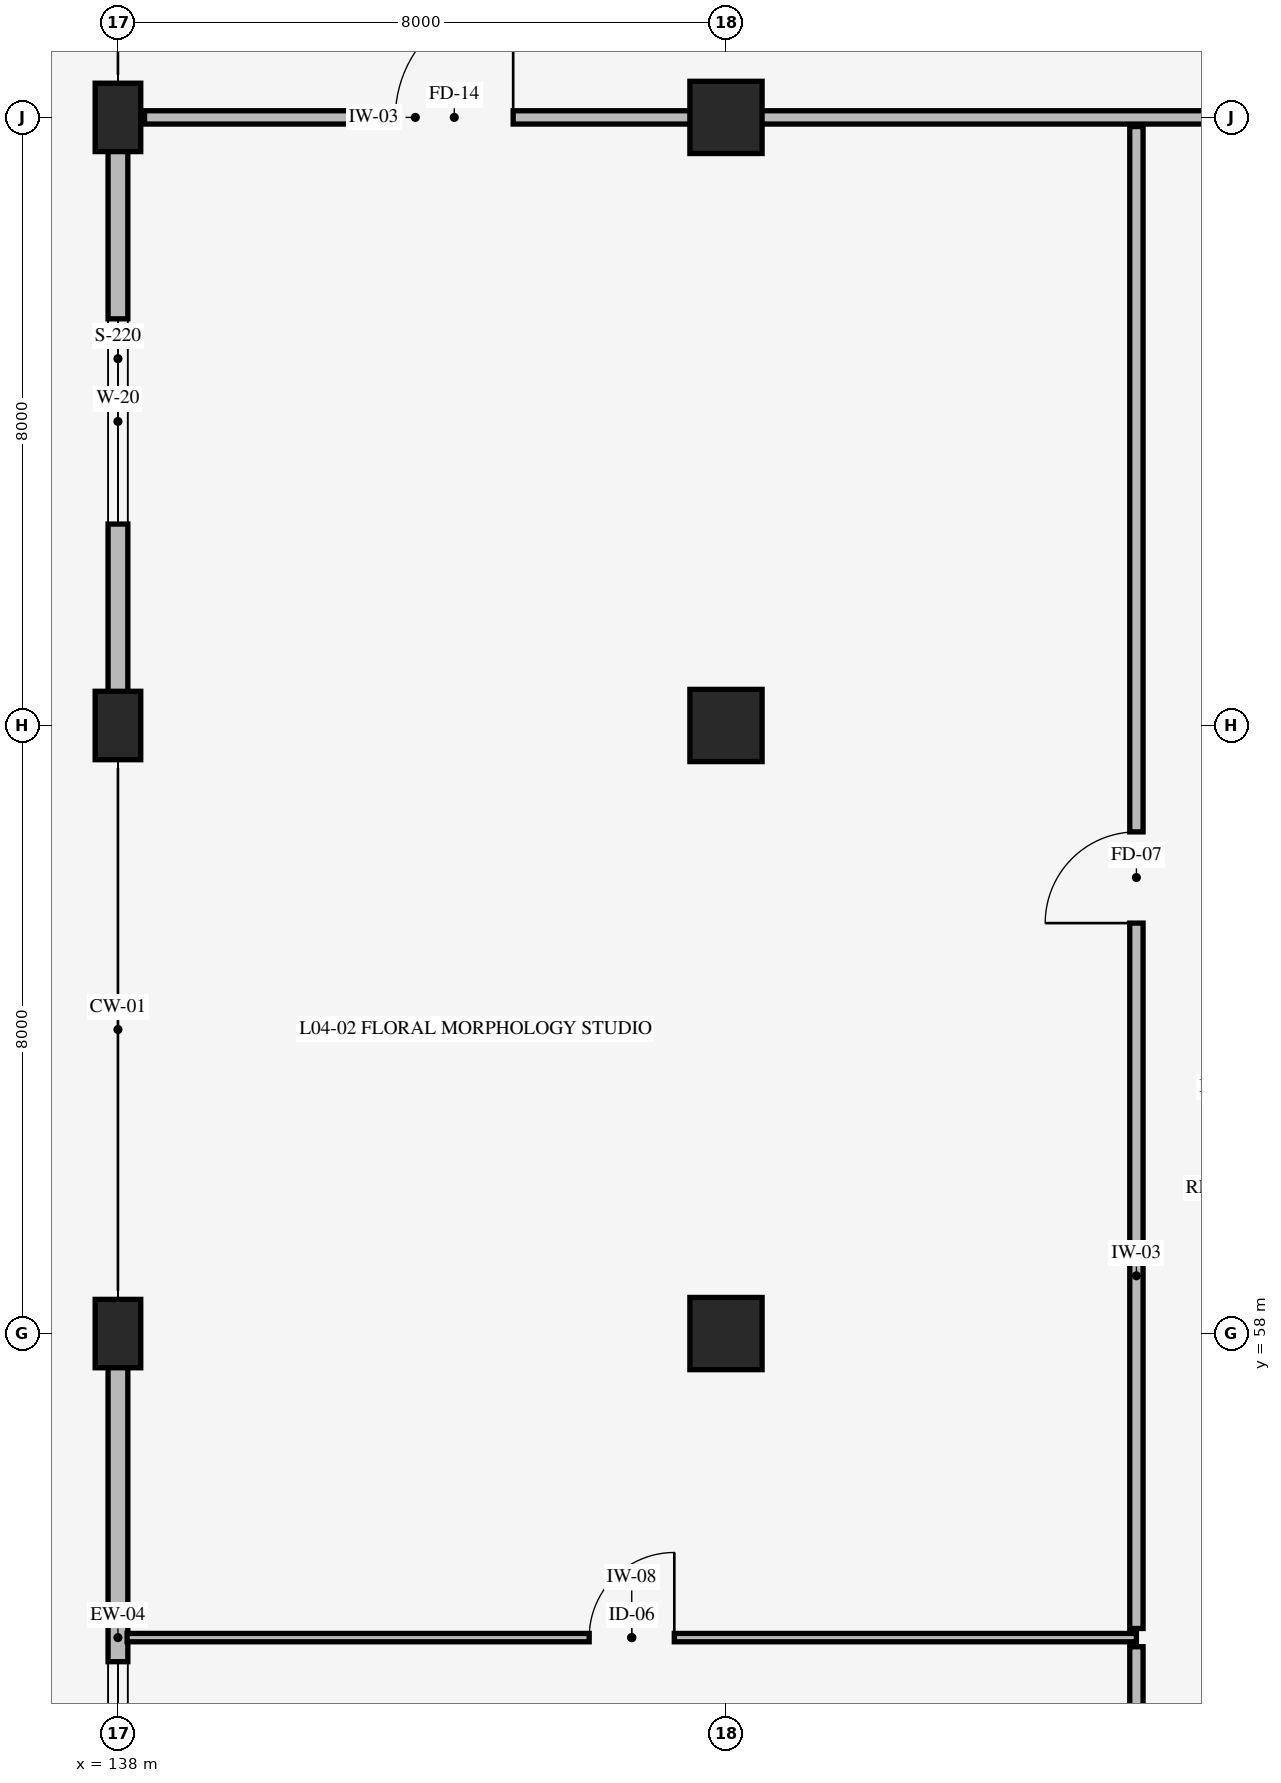
"""IFC4 building model, lengths in metres.
Left out: names, types, materials, properties, quantities, classifications, styles, units other than length and angle.
Written with IfcOpenShell. Run it as: python <this file> out.ifc"""

import sys

from ifc_helpers import new_model, si_unit, direction, frame, frame_2d, origin, origin_2d, place, context, subcontext, project, spatial, rectangle, extrude, element, fill, save


model = new_model("IFC4")
c1 = context("Model", 3, precision=1e-05, world=origin(), true_north=direction((0.0, 1.0)))
c2 = subcontext(c1, "Body", "Model", "MODEL_VIEW")
j1 = project(units=[si_unit("LENGTHUNIT", "METRE"), si_unit("PLANEANGLEUNIT", "RADIAN")], contexts=[c1])
p1 = place(None, origin())
s1 = spatial("IfcSite", under=j1, at=p1, CompositionType="ELEMENT")
p2 = place(p1, origin())
s2 = spatial("IfcBuilding", under=s1, at=p2, CompositionType="ELEMENT")
p3 = place(p2, frame((0.0, 0.0, 15.0)))
s3 = spatial("IfcBuildingStorey", under=s2, at=p3, CompositionType="ELEMENT", Elevation=15.0)
for number, where, z_axis, x_axis in (
    (1, (138.0, 58.0, 0.0), (0.0, 0.0, 1.0), (1.0, 0.0, 0.0)),
    (2, (138.0, 66.0, 0.0), (0.0, 0.0, 1.0), (1.0, 0.0, 0.0)),
    (3, (138.0, 74.0, 0.0), (0.0, 0.0, 1.0), (1.0, 0.0, 0.0)),
):
    element("IfcColumn", number, at=place(p3, frame(where, z_axis=z_axis, x_axis=x_axis)), inside=s3, PredefinedType="COLUMN", context=c2, shape_type="SweptSolid", body=[
        extrude(rectangle(XDim=0.6, YDim=0.9, at=origin_2d()), origin(), (0.0, 0.0, 1.0), 4.2),
    ])
for number, where, z_axis, x_axis in (
    (4, (146.0, 58.0, 0.0), (0.0, 0.0, 1.0), (1.0, 0.0, 0.0)),
    (5, (146.0, 66.0, 0.0), (0.0, 0.0, 1.0), (1.0, 0.0, 0.0)),
    (6, (146.0, 74.0, 0.0), (0.0, 0.0, 1.0), (1.0, 0.0, 0.0)),
):
    element("IfcColumn", number, at=place(p3, frame(where, z_axis=z_axis, x_axis=x_axis)), inside=s3, PredefinedType="COLUMN", context=c2, shape_type="SweptSolid", body=[
        extrude(rectangle(XDim=0.95, YDim=0.95, at=origin_2d()), origin(), (0.0, 0.0, 1.0), 4.2),
    ])
p4 = place(p3, frame((138.0, 50.0, 0.0), z_axis=(0.0, 0.0, 1.0), x_axis=(0.0, 1.0, 0.0)))
e7 = element("IfcWall", 7, at=p4, inside=s3, PredefinedType="STANDARD", context=c2, shape_type="SweptSolid", body=[
    extrude(rectangle(XDim=8.0, YDim=0.26, at=frame_2d((4.0, 0.0))), origin(), (0.0, 0.0, 1.0), 3.08),
])
p5 = place(p4, frame((1.383, 0.0, 0.85)))
e8 = element("IfcOpeningElement", 8, at=p5, cuts=e7, PredefinedType="OPENING", context=c2, shape_type="SweptSolid", body=[
    extrude(rectangle(XDim=2.3, YDim=1.5, at=frame_2d((1.15, 0.75))), frame((0.0, 0.14, 0.0), z_axis=(0.0, -1.0, 0.0), x_axis=(1.0, 0.0, 0.0)), (0.0, 0.0, 1.0), 0.28),
])
p6 = place(p3, frame((138.0, 66.0, 0.0), z_axis=(0.0, 0.0, 1.0), x_axis=(0.0, 1.0, 0.0)))
e9 = element("IfcWall", 9, at=p6, inside=s3, PredefinedType="STANDARD", context=c2, shape_type="SweptSolid", body=[
    extrude(rectangle(XDim=8.0, YDim=0.26, at=frame_2d((4.0, 0.0))), origin(), (0.0, 0.0, 1.0), 3.08),
])
p7 = place(p6, frame((2.65, 0.0, 0.85)))
e10 = element("IfcOpeningElement", 10, at=p7, cuts=e9, PredefinedType="OPENING", context=c2, shape_type="SweptSolid", body=[
    extrude(rectangle(XDim=2.7, YDim=1.8, at=frame_2d((1.35, 0.9))), frame((0.0, 0.14, 0.0), z_axis=(0.0, -1.0, 0.0), x_axis=(1.0, 0.0, 0.0)), (0.0, 0.0, 1.0), 0.28),
])
p8 = place(p3, frame((151.4, 34.12, 0.0), z_axis=(0.0, 0.0, 1.0), x_axis=(0.0, 1.0, 0.0)))
e11 = element("IfcWall", 11, at=p8, inside=s3, PredefinedType="STANDARD", context=c2, shape_type="SweptSolid", body=[
    extrude(rectangle(XDim=19.76, YDim=0.175, at=frame_2d((9.88, 0.0))), origin(), (0.0, 0.0, 1.0), 3.9),
])
p9 = place(p8, frame((9.305, 0.0, 0.0)))
e12 = element("IfcOpeningElement", 12, at=p9, cuts=e11, PredefinedType="OPENING", context=c2, shape_type="SweptSolid", body=[
    extrude(rectangle(XDim=1.15, YDim=2.1, at=frame_2d((0.575, 1.05))), frame((0.0, 0.098, 0.0), z_axis=(0.0, -1.0, 0.0), x_axis=(1.0, 0.0, 0.0)), (0.0, 0.0, 1.0), 0.195),
])
p10 = place(p3, frame((138.12, 54.0, 0.0), z_axis=(0.0, 0.0, 1.0), x_axis=(1.0, 0.0, 0.0)))
e13 = element("IfcWall", 13, at=p10, inside=s3, PredefinedType="STANDARD", context=c2, shape_type="SweptSolid", body=[
    extrude(rectangle(XDim=13.28, YDim=0.11, at=frame_2d((6.64, 0.0))), origin(), (0.0, 0.0, 1.0), 3.9),
])
p11 = place(p10, frame((6.08, 0.0, 0.0)))
e14 = element("IfcOpeningElement", 14, at=p11, cuts=e13, PredefinedType="OPENING", context=c2, shape_type="SweptSolid", body=[
    extrude(rectangle(XDim=1.12, YDim=2.12, at=frame_2d((0.56, 1.06))), frame((0.0, 0.065, 0.0), z_axis=(0.0, -1.0, 0.0), x_axis=(1.0, 0.0, 0.0)), (0.0, 0.0, 1.0), 0.13),
])
p12 = place(p3, frame((151.4, 54.12, 0.0), z_axis=(0.0, 0.0, 1.0), x_axis=(0.0, 1.0, 0.0)))
e15 = element("IfcWall", 15, at=p12, inside=s3, PredefinedType="STANDARD", context=c2, shape_type="SweptSolid", body=[
    extrude(rectangle(XDim=19.76, YDim=0.175, at=frame_2d((9.88, 0.0))), origin(), (0.0, 0.0, 1.0), 3.9),
])
p13 = place(p12, frame((9.28, 0.0, 0.0)))
e16 = element("IfcOpeningElement", 16, at=p13, cuts=e15, PredefinedType="OPENING", context=c2, shape_type="SweptSolid", body=[
    extrude(rectangle(XDim=1.2, YDim=2.1, at=frame_2d((0.6, 1.05))), frame((0.0, 0.098, 0.0), z_axis=(0.0, -1.0, 0.0), x_axis=(1.0, 0.0, 0.0)), (0.0, 0.0, 1.0), 0.195),
])
p14 = place(p3, frame((138.35, 74.0, 0.0), z_axis=(0.0, 0.0, 1.0), x_axis=(1.0, 0.0, 0.0)))
e17 = element("IfcWall", 17, at=p14, inside=s3, PredefinedType="STANDARD", context=c2, shape_type="SweptSolid", body=[
    extrude(rectangle(XDim=23.3, YDim=0.175, at=frame_2d((11.65, 0.0))), origin(), (0.0, 0.0, 1.0), 3.03),
])
p15 = place(p14, frame((3.3, 0.0, 0.0)))
e18 = element("IfcOpeningElement", 18, at=p15, cuts=e17, PredefinedType="OPENING", context=c2, shape_type="SweptSolid", body=[
    extrude(rectangle(XDim=1.55, YDim=2.25, at=frame_2d((0.775, 1.125))), frame((0.0, 0.098, 0.0), z_axis=(0.0, -1.0, 0.0), x_axis=(1.0, 0.0, 0.0)), (0.0, 0.0, 1.0), 0.195),
])
p16 = place(p5, origin())
e19 = element("IfcWindow", 19, at=p16, inside=s3, PartitioningType="SINGLE_PANEL", PredefinedType="WINDOW", context=c2, shape_type="SweptSolid", body=[
    extrude(rectangle(XDim=2.3, YDim=1.5, at=frame_2d((1.15, 0.75))), frame((0.0, 0.03, 0.0), z_axis=(0.0, -1.0, 0.0), x_axis=(1.0, 0.0, 0.0)), (0.0, 0.0, 1.0), 0.06),
])
fill(e8, e19)
p17 = place(p7, origin())
e20 = element("IfcWindow", 20, at=p17, inside=s3, PartitioningType="SINGLE_PANEL", PredefinedType="WINDOW", context=c2, shape_type="SweptSolid", body=[
    extrude(rectangle(XDim=2.7, YDim=1.8, at=frame_2d((1.35, 0.9))), frame((0.0, 0.03, 0.0), z_axis=(0.0, -1.0, 0.0), x_axis=(1.0, 0.0, 0.0)), (0.0, 0.0, 1.0), 0.06),
])
fill(e10, e20)
p18 = place(p11, origin())
e21 = element("IfcDoor", 21, at=p18, inside=s3, OperationType="SINGLE_SWING_RIGHT", PredefinedType="DOOR", context=c2, shape_type="SweptSolid", body=[
    extrude(rectangle(XDim=1.12, YDim=2.12, at=frame_2d((0.56, 1.06))), frame((0.0, 0.025, 0.0), z_axis=(0.0, -1.0, 0.0), x_axis=(1.0, 0.0, 0.0)), (0.0, 0.0, 1.0), 0.05),
])
fill(e14, e21)
p19 = place(p13, origin())
e22 = element("IfcDoor", 22, at=p19, inside=s3, OperationType="SINGLE_SWING_LEFT", PredefinedType="DOOR", context=c2, shape_type="SweptSolid", body=[
    extrude(rectangle(XDim=1.2, YDim=2.1, at=frame_2d((0.6, 1.05))), frame((0.0, 0.025, 0.0), z_axis=(0.0, -1.0, 0.0), x_axis=(1.0, 0.0, 0.0)), (0.0, 0.0, 1.0), 0.05),
])
fill(e16, e22)
p20 = place(p15, origin())
e23 = element("IfcDoor", 23, at=p20, inside=s3, OperationType="SINGLE_SWING_RIGHT", PredefinedType="DOOR", context=c2, shape_type="SweptSolid", body=[
    extrude(rectangle(XDim=1.55, YDim=2.25, at=frame_2d((0.775, 1.125))), frame((0.0, 0.025, 0.0), z_axis=(0.0, -1.0, 0.0), x_axis=(1.0, 0.0, 0.0)), (0.0, 0.0, 1.0), 0.05),
])
fill(e18, e23)
save(model, sys.argv[1])
